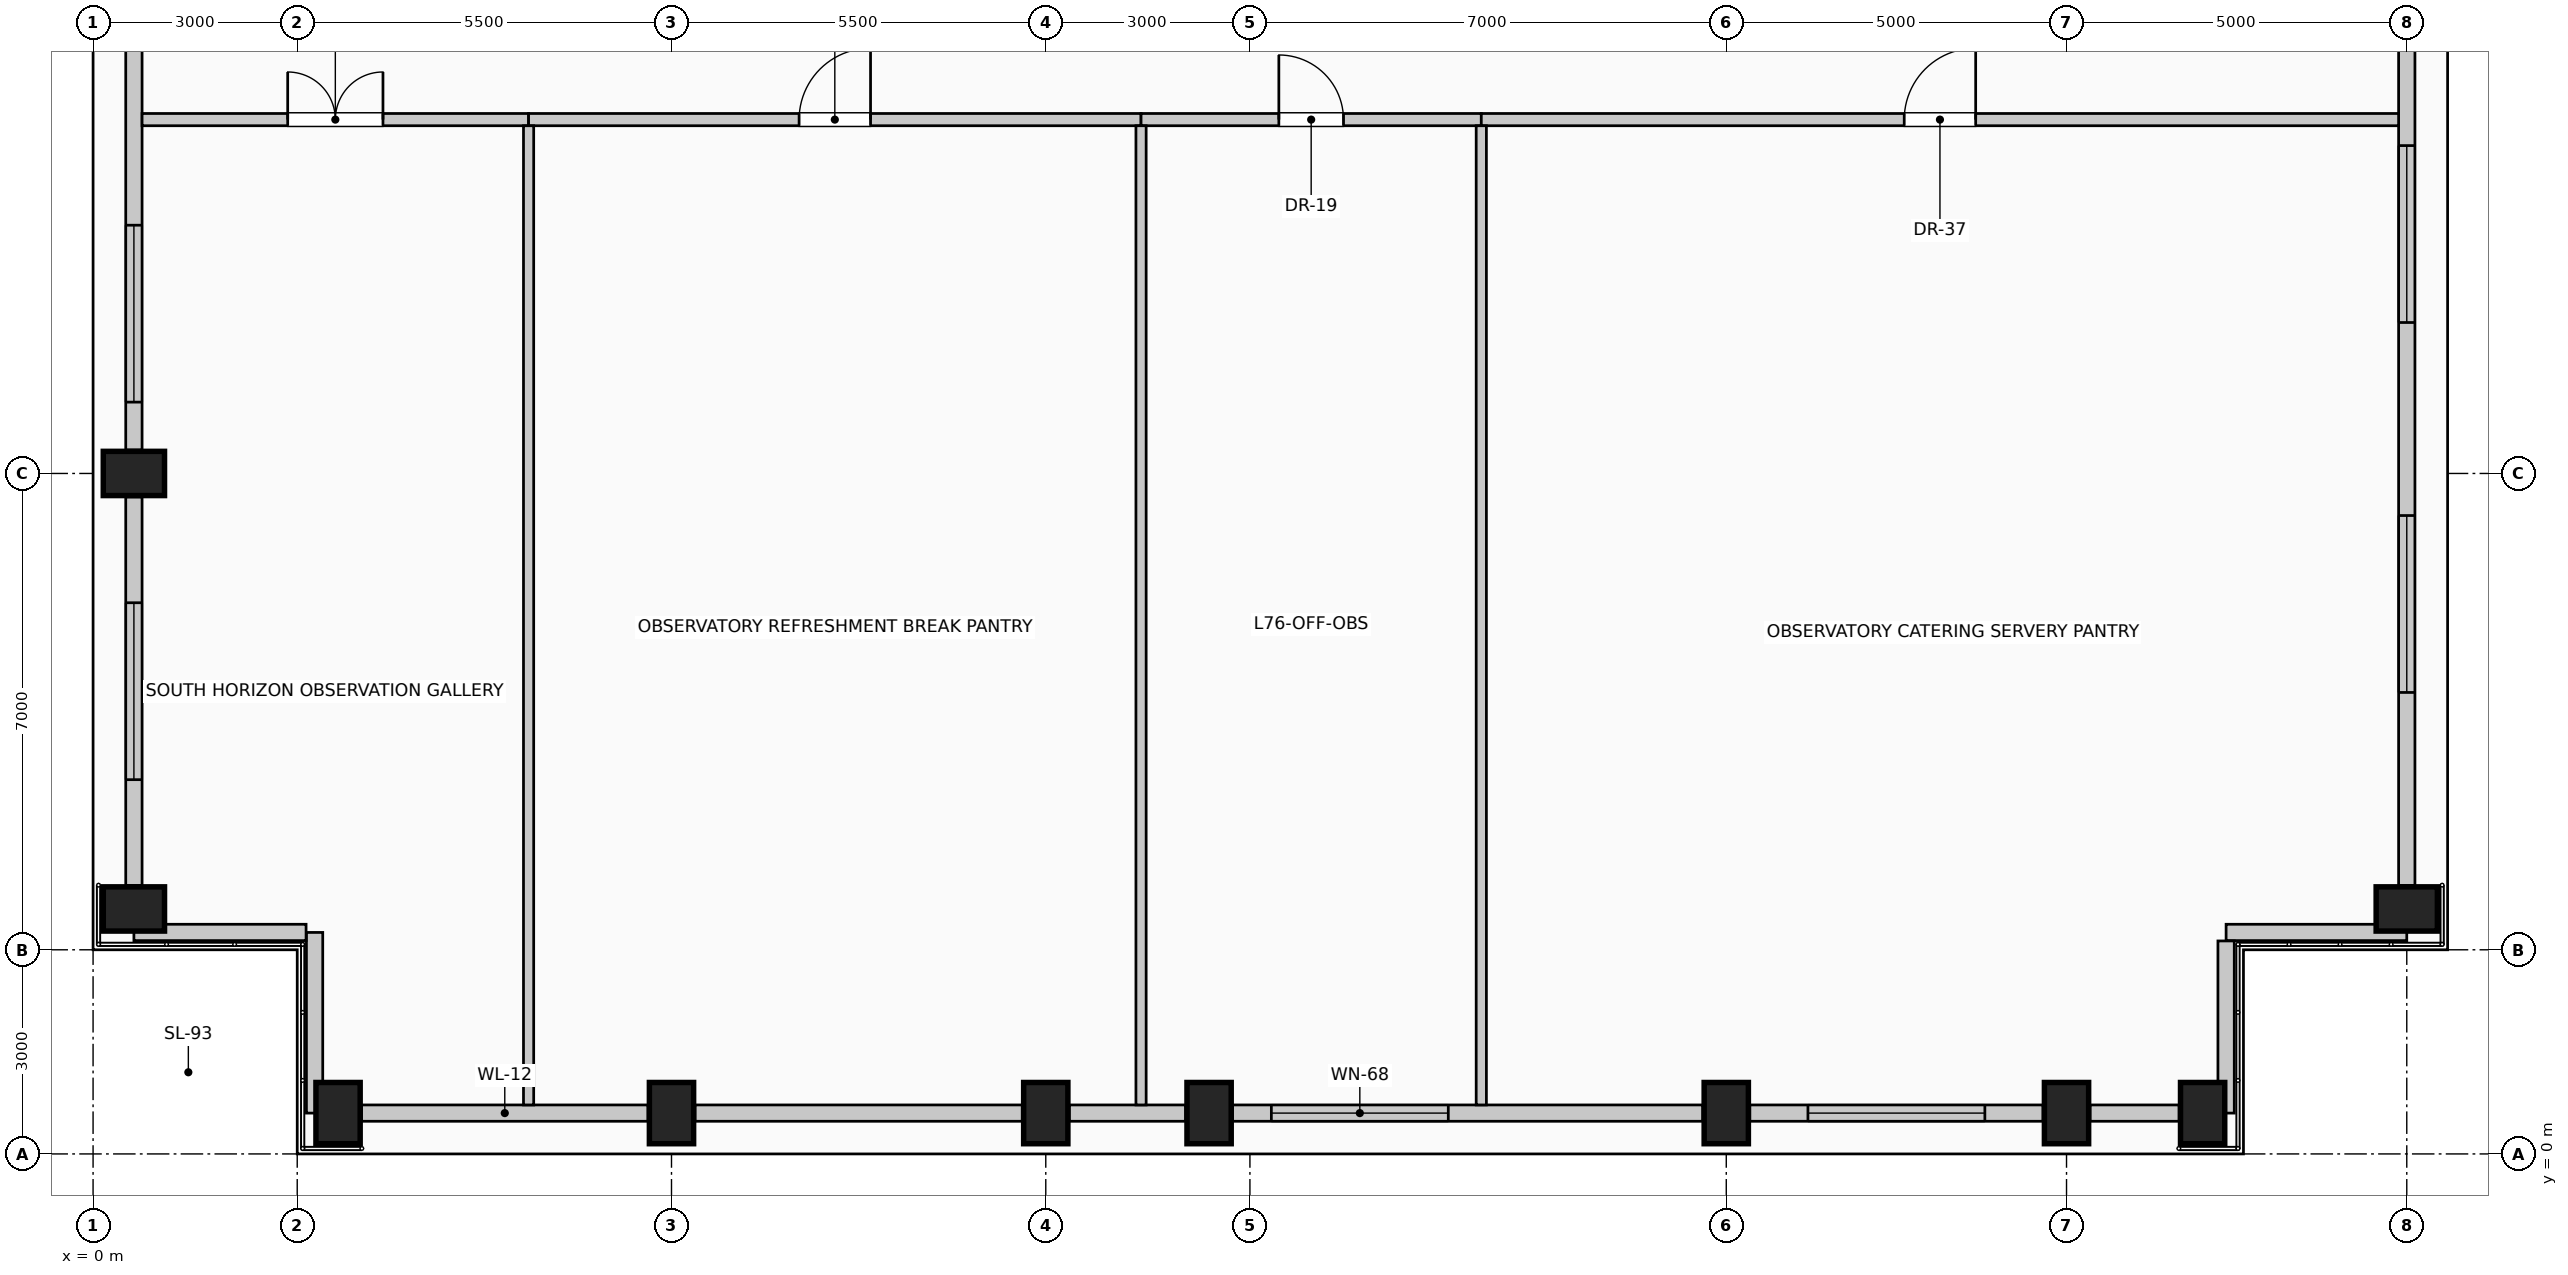
"""IFC4 building model, lengths in metres.
Left out: names, types, materials, properties, quantities, classifications, styles, units other than length and angle.
Written with IfcOpenShell. Run it as: python <this file> out.ifc"""

import sys

from ifc_helpers import new_model, si_unit, direction, frame, frame_2d, origin, origin_2d, place, context, subcontext, project, spatial, rectangle, extrude, element, fill, save


model = new_model("IFC4")
c1 = context("Model", 3, precision=1e-05, world=origin(), true_north=direction((0.0, 1.0)))
c2 = subcontext(c1, "Body", "Model", "MODEL_VIEW")
j1 = project(units=[si_unit("LENGTHUNIT", "METRE"), si_unit("PLANEANGLEUNIT", "RADIAN")], contexts=[c1])
p1 = place(None, origin())
s1 = spatial("IfcSite", under=j1, at=p1, CompositionType="ELEMENT")
p2 = place(p1, origin())
s2 = spatial("IfcBuilding", under=s1, at=p2, CompositionType="ELEMENT")
p3 = place(p2, frame((0.0, 0.0, 313.0)))
s3 = spatial("IfcBuildingStorey", under=s2, at=p3, CompositionType="ELEMENT", Elevation=313.0)
for number, where, z_axis, x_axis in (
    (1, (3.6, 0.6, 0.0), (0.0, 0.0, 1.0), (1.0, 0.0, 0.0)),
    (2, (8.5, 0.6, 0.0), (0.0, 0.0, 1.0), (1.0, 0.0, 0.0)),
    (3, (14.0, 0.6, 0.0), (0.0, 0.0, 1.0), (1.0, 0.0, 0.0)),
    (4, (16.4, 0.6, 0.0), (0.0, 0.0, 1.0), (1.0, 0.0, 0.0)),
    (5, (24.0, 0.6, 0.0), (0.0, 0.0, 1.0), (1.0, 0.0, 0.0)),
    (6, (29.0, 0.6, 0.0), (0.0, 0.0, 1.0), (1.0, 0.0, 0.0)),
    (7, (31.0, 0.6, 0.0), (0.0, 0.0, 1.0), (1.0, 0.0, 0.0)),
    (8, (0.6, 3.6, 0.0), (0.0, 0.0, 1.0), (0.0, 1.0, 0.0)),
    (9, (34.0, 3.6, 0.0), (0.0, 0.0, 1.0), (0.0, 1.0, 0.0)),
    (10, (0.6, 10.0, 0.0), (0.0, 0.0, 1.0), (0.0, 1.0, 0.0)),
):
    element("IfcColumn", number, at=place(p3, frame(where, z_axis=z_axis, x_axis=x_axis)), inside=s3, PredefinedType="COLUMN", context=c2, shape_type="SweptSolid", body=[
        extrude(rectangle(XDim=0.65, YDim=0.9, at=origin_2d()), origin(), (0.0, 0.0, 1.0), 4.8),
    ])
p4 = place(p3, frame((8.155, 0.6, 0.0), z_axis=(0.0, 0.0, 1.0), x_axis=(-1.0, 0.0, 0.0)))
e11 = element("IfcWall", 11, at=p4, inside=s3, PredefinedType="SOLIDWALL", context=c2, shape_type="SweptSolid", body=[
    extrude(rectangle(XDim=4.21, YDim=0.24, at=frame_2d((2.105, 0.0))), origin(), (0.0, 0.0, 1.0), 3.71),
])
p5 = place(p3, frame((13.655, 0.6, 0.0), z_axis=(0.0, 0.0, 1.0), x_axis=(-1.0, 0.0, 0.0)))
e12 = element("IfcWall", 12, at=p5, inside=s3, PredefinedType="SOLIDWALL", context=c2, shape_type="SweptSolid", body=[
    extrude(rectangle(XDim=4.81, YDim=0.24, at=frame_2d((2.405, 0.0))), origin(), (0.0, 0.0, 1.0), 3.71),
])
p6 = place(p3, frame((16.055, 0.6, 0.0), z_axis=(0.0, 0.0, 1.0), x_axis=(-1.0, 0.0, 0.0)))
e13 = element("IfcWall", 13, at=p6, inside=s3, PredefinedType="SOLIDWALL", context=c2, shape_type="SweptSolid", body=[
    extrude(rectangle(XDim=1.71, YDim=0.24, at=frame_2d((0.855, 0.0))), origin(), (0.0, 0.0, 1.0), 3.71),
])
p7 = place(p3, frame((23.655, 0.6, 0.0), z_axis=(0.0, 0.0, 1.0), x_axis=(-1.0, 0.0, 0.0)))
e14 = element("IfcWall", 14, at=p7, inside=s3, PredefinedType="SOLIDWALL", context=c2, shape_type="SweptSolid", body=[
    extrude(rectangle(XDim=6.91, YDim=0.24, at=frame_2d((3.455, 0.0))), origin(), (0.0, 0.0, 1.0), 2.86),
])
p8 = place(p7, frame((3.74, 0.0, 0.35)))
e15 = element("IfcOpeningElement", 15, at=p8, cuts=e14, PredefinedType="OPENING", context=c2, shape_type="SweptSolid", body=[
    extrude(rectangle(XDim=2.6, YDim=2.4, at=frame_2d((1.3, 1.2))), frame((0.0, 0.13, 0.0), z_axis=(0.0, -1.0, 0.0), x_axis=(1.0, 0.0, 0.0)), (0.0, 0.0, 1.0), 0.26),
])
p9 = place(p3, frame((28.655, 0.6, 0.0), z_axis=(0.0, 0.0, 1.0), x_axis=(-1.0, 0.0, 0.0)))
e16 = element("IfcWall", 16, at=p9, inside=s3, PredefinedType="SOLIDWALL", context=c2, shape_type="SweptSolid", body=[
    extrude(rectangle(XDim=4.31, YDim=0.24, at=frame_2d((2.155, 0.0))), origin(), (0.0, 0.0, 1.0), 2.86),
])
p10 = place(p9, frame((0.855, 0.0, 0.35)))
e17 = element("IfcOpeningElement", 17, at=p10, cuts=e16, PredefinedType="OPENING", context=c2, shape_type="SweptSolid", body=[
    extrude(rectangle(XDim=2.6, YDim=2.4, at=frame_2d((1.3, 1.2))), frame((0.0, 0.13, 0.0), z_axis=(0.0, -1.0, 0.0), x_axis=(1.0, 0.0, 0.0)), (0.0, 0.0, 1.0), 0.26),
])
p11 = place(p3, frame((30.655, 0.6, 0.0), z_axis=(0.0, 0.0, 1.0), x_axis=(-1.0, 0.0, 0.0)))
e18 = element("IfcWall", 18, at=p11, inside=s3, PredefinedType="SOLIDWALL", context=c2, shape_type="SweptSolid", body=[
    extrude(rectangle(XDim=1.31, YDim=0.24, at=frame_2d((0.655, 0.0))), origin(), (0.0, 0.0, 1.0), 2.86),
])
p12 = place(p3, frame((0.6, 3.945, 0.0), z_axis=(0.0, 0.0, 1.0), x_axis=(0.0, 1.0, 0.0)))
e19 = element("IfcWall", 19, at=p12, inside=s3, PredefinedType="SOLIDWALL", context=c2, shape_type="SweptSolid", body=[
    extrude(rectangle(XDim=5.71, YDim=0.24, at=frame_2d((2.855, 0.0))), origin(), (0.0, 0.0, 1.0), 3.71),
])
p13 = place(p12, frame((1.555, 0.0, 0.35)))
e20 = element("IfcOpeningElement", 20, at=p13, cuts=e19, PredefinedType="OPENING", context=c2, shape_type="SweptSolid", body=[
    extrude(rectangle(XDim=2.6, YDim=2.4, at=frame_2d((1.3, 1.2))), frame((0.0, 0.13, 0.0), z_axis=(0.0, -1.0, 0.0), x_axis=(1.0, 0.0, 0.0)), (0.0, 0.0, 1.0), 0.26),
])
p14 = place(p3, frame((0.6, 10.345, 0.0), z_axis=(0.0, 0.0, 1.0), x_axis=(0.0, 1.0, 0.0)))
e21 = element("IfcWall", 21, at=p14, inside=s3, PredefinedType="SOLIDWALL", context=c2, shape_type="SweptSolid", body=[
    extrude(rectangle(XDim=7.31, YDim=0.24, at=frame_2d((3.655, 0.0))), origin(), (0.0, 0.0, 1.0), 3.71),
])
p15 = place(p14, frame((0.703, 0.0, 0.35)))
e22 = element("IfcOpeningElement", 22, at=p15, cuts=e21, PredefinedType="OPENING", context=c2, shape_type="SweptSolid", body=[
    extrude(rectangle(XDim=2.6, YDim=2.4, at=frame_2d((1.3, 1.2))), frame((0.0, 0.13, 0.0), z_axis=(0.0, -1.0, 0.0), x_axis=(1.0, 0.0, 0.0)), (0.0, 0.0, 1.0), 0.26),
])
p16 = place(p3, frame((34.0, 17.655, 0.0), z_axis=(0.0, 0.0, 1.0), x_axis=(0.0, -1.0, 0.0)))
e23 = element("IfcWall", 23, at=p16, inside=s3, PredefinedType="SOLIDWALL", context=c2, shape_type="SweptSolid", body=[
    extrude(rectangle(XDim=13.71, YDim=0.24, at=frame_2d((6.855, 0.0))), origin(), (0.0, 0.0, 1.0), 3.78),
])
p17 = place(p16, frame((2.837, 0.0, 0.35)))
e24 = element("IfcOpeningElement", 24, at=p17, cuts=e23, PredefinedType="OPENING", context=c2, shape_type="SweptSolid", body=[
    extrude(rectangle(XDim=2.6, YDim=2.4, at=frame_2d((1.3, 1.2))), frame((0.0, 0.13, 0.0), z_axis=(0.0, -1.0, 0.0), x_axis=(1.0, 0.0, 0.0)), (0.0, 0.0, 1.0), 0.26),
])
p18 = place(p16, frame((8.273, 0.0, 0.35)))
e25 = element("IfcOpeningElement", 25, at=p18, cuts=e23, PredefinedType="OPENING", context=c2, shape_type="SweptSolid", body=[
    extrude(rectangle(XDim=2.6, YDim=2.4, at=frame_2d((1.3, 1.2))), frame((0.0, 0.13, 0.0), z_axis=(0.0, -1.0, 0.0), x_axis=(1.0, 0.0, 0.0)), (0.0, 0.0, 1.0), 0.26),
])
p19 = place(p3, frame((34.0, 3.255, 0.0), z_axis=(0.0, 0.0, 1.0), x_axis=(-1.0, 0.0, 0.0)))
e26 = element("IfcWall", 26, at=p19, inside=s3, PredefinedType="SOLIDWALL", context=c2, shape_type="SweptSolid", body=[
    extrude(rectangle(XDim=2.655, YDim=0.24, at=frame_2d((1.328, 0.0))), origin(), (0.0, 0.0, 1.0), 2.93),
])
p20 = place(p3, frame((31.345, 3.13, 0.0), z_axis=(0.0, 0.0, 1.0), x_axis=(0.0, -1.0, 0.0)))
e27 = element("IfcWall", 27, at=p20, inside=s3, PredefinedType="SOLIDWALL", context=c2, shape_type="SweptSolid", body=[
    extrude(rectangle(XDim=2.53, YDim=0.24, at=frame_2d((1.265, 0.0))), origin(), (0.0, 0.0, 1.0), 2.93),
])
p21 = place(p3, frame((3.255, 0.6, 0.0), z_axis=(0.0, 0.0, 1.0), x_axis=(0.0, 1.0, 0.0)))
e28 = element("IfcWall", 28, at=p21, inside=s3, PredefinedType="SOLIDWALL", context=c2, shape_type="SweptSolid", body=[
    extrude(rectangle(XDim=2.655, YDim=0.24, at=frame_2d((1.327, 0.0))), origin(), (0.0, 0.0, 1.0), 4.46),
])
p22 = place(p3, frame((3.13, 3.255, 0.0), z_axis=(0.0, 0.0, 1.0), x_axis=(-1.0, 0.0, 0.0)))
e29 = element("IfcWall", 29, at=p22, inside=s3, PredefinedType="SOLIDWALL", context=c2, shape_type="SweptSolid", body=[
    extrude(rectangle(XDim=2.53, YDim=0.24, at=frame_2d((1.265, 0.0))), origin(), (0.0, 0.0, 1.0), 4.46),
])
p23 = place(p3, frame((0.72, 15.2, 0.0), z_axis=(0.0, 0.0, 1.0), x_axis=(1.0, 0.0, 0.0)))
e30 = element("IfcWall", 30, at=p23, inside=s3, PredefinedType="PARTITIONING", context=c2, shape_type="SweptSolid", body=[
    extrude(rectangle(XDim=5.68, YDim=0.18, at=frame_2d((2.84, 0.0))), origin(), (0.0, 0.0, 1.0), 4.46),
])
p24 = place(p23, frame((2.14, 0.0, 0.0)))
e31 = element("IfcOpeningElement", 31, at=p24, cuts=e30, PredefinedType="OPENING", context=c2, shape_type="SweptSolid", body=[
    extrude(rectangle(XDim=1.4, YDim=2.2, at=frame_2d((0.7, 1.1))), frame((0.0, 0.1, 0.0), z_axis=(0.0, -1.0, 0.0), x_axis=(1.0, 0.0, 0.0)), (0.0, 0.0, 1.0), 0.2),
])
p25 = place(p3, frame((6.4, 15.2, 0.0), z_axis=(0.0, 0.0, 1.0), x_axis=(1.0, 0.0, 0.0)))
e32 = element("IfcWall", 32, at=p25, inside=s3, PredefinedType="PARTITIONING", context=c2, shape_type="SweptSolid", body=[
    extrude(rectangle(XDim=9.0, YDim=0.18, at=frame_2d((4.5, 0.0))), origin(), (0.0, 0.0, 1.0), 4.46),
])
p26 = place(p25, frame((3.975, 0.0, 0.0)))
e33 = element("IfcOpeningElement", 33, at=p26, cuts=e32, PredefinedType="OPENING", context=c2, shape_type="SweptSolid", body=[
    extrude(rectangle(XDim=1.05, YDim=2.15, at=frame_2d((0.525, 1.075))), frame((0.0, 0.1, 0.0), z_axis=(0.0, -1.0, 0.0), x_axis=(1.0, 0.0, 0.0)), (0.0, 0.0, 1.0), 0.2),
])
p27 = place(p3, frame((15.4, 15.2, 0.0), z_axis=(0.0, 0.0, 1.0), x_axis=(1.0, 0.0, 0.0)))
e34 = element("IfcWall", 34, at=p27, inside=s3, PredefinedType="PARTITIONING", context=c2, shape_type="SweptSolid", body=[
    extrude(rectangle(XDim=5.0, YDim=0.18, at=frame_2d((2.5, 0.0))), origin(), (0.0, 0.0, 1.0), 4.46),
])
p28 = place(p27, frame((2.025, 0.0, 0.0)))
e35 = element("IfcOpeningElement", 35, at=p28, cuts=e34, PredefinedType="OPENING", context=c2, shape_type="SweptSolid", body=[
    extrude(rectangle(XDim=0.95, YDim=2.15, at=frame_2d((0.475, 1.075))), frame((0.0, 0.1, 0.0), z_axis=(0.0, -1.0, 0.0), x_axis=(1.0, 0.0, 0.0)), (0.0, 0.0, 1.0), 0.2),
])
p29 = place(p3, frame((20.4, 15.2, 0.0), z_axis=(0.0, 0.0, 1.0), x_axis=(1.0, 0.0, 0.0)))
e36 = element("IfcWall", 36, at=p29, inside=s3, PredefinedType="PARTITIONING", context=c2, shape_type="SweptSolid", body=[
    extrude(rectangle(XDim=13.48, YDim=0.18, at=frame_2d((6.74, 0.0))), origin(), (0.0, 0.0, 1.0), 4.46),
])
p30 = place(p29, frame((6.215, 0.0, 0.0)))
e37 = element("IfcOpeningElement", 37, at=p30, cuts=e36, PredefinedType="OPENING", context=c2, shape_type="SweptSolid", body=[
    extrude(rectangle(XDim=1.05, YDim=2.15, at=frame_2d((0.525, 1.075))), frame((0.0, 0.1, 0.0), z_axis=(0.0, -1.0, 0.0), x_axis=(1.0, 0.0, 0.0)), (0.0, 0.0, 1.0), 0.2),
])
for number, where, z_axis, x_axis in (
    (38, (6.4, 0.72, 0.0), (0.0, 0.0, 1.0), (0.0, 1.0, 0.0)),
    (39, (15.4, 0.72, 0.0), (0.0, 0.0, 1.0), (0.0, 1.0, 0.0)),
    (40, (20.4, 0.72, 0.0), (0.0, 0.0, 1.0), (0.0, 1.0, 0.0)),
):
    element("IfcWall", number, at=place(p3, frame(where, z_axis=z_axis, x_axis=x_axis)), inside=s3, PredefinedType="PARTITIONING", context=c2, shape_type="SweptSolid", body=[
        extrude(rectangle(XDim=14.39, YDim=0.15, at=frame_2d((7.195, 0.0))), origin(), (0.0, 0.0, 1.0), 4.46),
    ])
p31 = place(p8, origin())
e41 = element("IfcWindow", 41, at=p31, inside=s3, PartitioningType="SINGLE_PANEL", PredefinedType="WINDOW", context=c2, shape_type="SweptSolid", body=[
    extrude(rectangle(XDim=2.6, YDim=2.4, at=frame_2d((1.3, 1.2))), frame((0.0, 0.03, 0.0), z_axis=(0.0, -1.0, 0.0), x_axis=(1.0, 0.0, 0.0)), (0.0, 0.0, 1.0), 0.06),
])
fill(e15, e41)
p32 = place(p10, origin())
e42 = element("IfcWindow", 42, at=p32, inside=s3, PartitioningType="SINGLE_PANEL", PredefinedType="WINDOW", context=c2, shape_type="SweptSolid", body=[
    extrude(rectangle(XDim=2.6, YDim=2.4, at=frame_2d((1.3, 1.2))), frame((0.0, 0.03, 0.0), z_axis=(0.0, -1.0, 0.0), x_axis=(1.0, 0.0, 0.0)), (0.0, 0.0, 1.0), 0.06),
])
fill(e17, e42)
p33 = place(p13, origin())
e43 = element("IfcWindow", 43, at=p33, inside=s3, PartitioningType="SINGLE_PANEL", PredefinedType="WINDOW", context=c2, shape_type="SweptSolid", body=[
    extrude(rectangle(XDim=2.6, YDim=2.4, at=frame_2d((1.3, 1.2))), frame((0.0, 0.03, 0.0), z_axis=(0.0, -1.0, 0.0), x_axis=(1.0, 0.0, 0.0)), (0.0, 0.0, 1.0), 0.06),
])
fill(e20, e43)
p34 = place(p15, origin())
e44 = element("IfcWindow", 44, at=p34, inside=s3, PartitioningType="SINGLE_PANEL", PredefinedType="WINDOW", context=c2, shape_type="SweptSolid", body=[
    extrude(rectangle(XDim=2.6, YDim=2.4, at=frame_2d((1.3, 1.2))), frame((0.0, 0.03, 0.0), z_axis=(0.0, -1.0, 0.0), x_axis=(1.0, 0.0, 0.0)), (0.0, 0.0, 1.0), 0.06),
])
fill(e22, e44)
p35 = place(p17, origin())
e45 = element("IfcWindow", 45, at=p35, inside=s3, PartitioningType="SINGLE_PANEL", PredefinedType="WINDOW", context=c2, shape_type="SweptSolid", body=[
    extrude(rectangle(XDim=2.6, YDim=2.4, at=frame_2d((1.3, 1.2))), frame((0.0, 0.03, 0.0), z_axis=(0.0, -1.0, 0.0), x_axis=(1.0, 0.0, 0.0)), (0.0, 0.0, 1.0), 0.06),
])
fill(e24, e45)
p36 = place(p18, origin())
e46 = element("IfcWindow", 46, at=p36, inside=s3, PartitioningType="SINGLE_PANEL", PredefinedType="WINDOW", context=c2, shape_type="SweptSolid", body=[
    extrude(rectangle(XDim=2.6, YDim=2.4, at=frame_2d((1.3, 1.2))), frame((0.0, 0.03, 0.0), z_axis=(0.0, -1.0, 0.0), x_axis=(1.0, 0.0, 0.0)), (0.0, 0.0, 1.0), 0.06),
])
fill(e25, e46)
p37 = place(p24, origin())
e47 = element("IfcDoor", 47, at=p37, inside=s3, OperationType="DOUBLE_DOOR_SINGLE_SWING", PredefinedType="DOOR", context=c2, shape_type="SweptSolid", body=[
    extrude(rectangle(XDim=1.4, YDim=2.2, at=frame_2d((0.7, 1.1))), frame((0.0, 0.025, 0.0), z_axis=(0.0, -1.0, 0.0), x_axis=(1.0, 0.0, 0.0)), (0.0, 0.0, 1.0), 0.05),
])
fill(e31, e47)
p38 = place(p26, origin())
e48 = element("IfcDoor", 48, at=p38, inside=s3, OperationType="SINGLE_SWING_RIGHT", PredefinedType="DOOR", context=c2, shape_type="SweptSolid", body=[
    extrude(rectangle(XDim=1.05, YDim=2.15, at=frame_2d((0.525, 1.075))), frame((0.0, 0.025, 0.0), z_axis=(0.0, -1.0, 0.0), x_axis=(1.0, 0.0, 0.0)), (0.0, 0.0, 1.0), 0.05),
])
fill(e33, e48)
p39 = place(p28, origin())
e49 = element("IfcDoor", 49, at=p39, inside=s3, OperationType="SINGLE_SWING_LEFT", PredefinedType="DOOR", context=c2, shape_type="SweptSolid", body=[
    extrude(rectangle(XDim=0.95, YDim=2.15, at=frame_2d((0.475, 1.075))), frame((0.0, 0.025, 0.0), z_axis=(0.0, -1.0, 0.0), x_axis=(1.0, 0.0, 0.0)), (0.0, 0.0, 1.0), 0.05),
])
fill(e35, e49)
p40 = place(p30, origin())
e50 = element("IfcDoor", 50, at=p40, inside=s3, OperationType="SINGLE_SWING_RIGHT", PredefinedType="DOOR", context=c2, shape_type="SweptSolid", body=[
    extrude(rectangle(XDim=1.05, YDim=2.15, at=frame_2d((0.525, 1.075))), frame((0.0, 0.025, 0.0), z_axis=(0.0, -1.0, 0.0), x_axis=(1.0, 0.0, 0.0)), (0.0, 0.0, 1.0), 0.05),
])
fill(e37, e50)
save(model, sys.argv[1])
